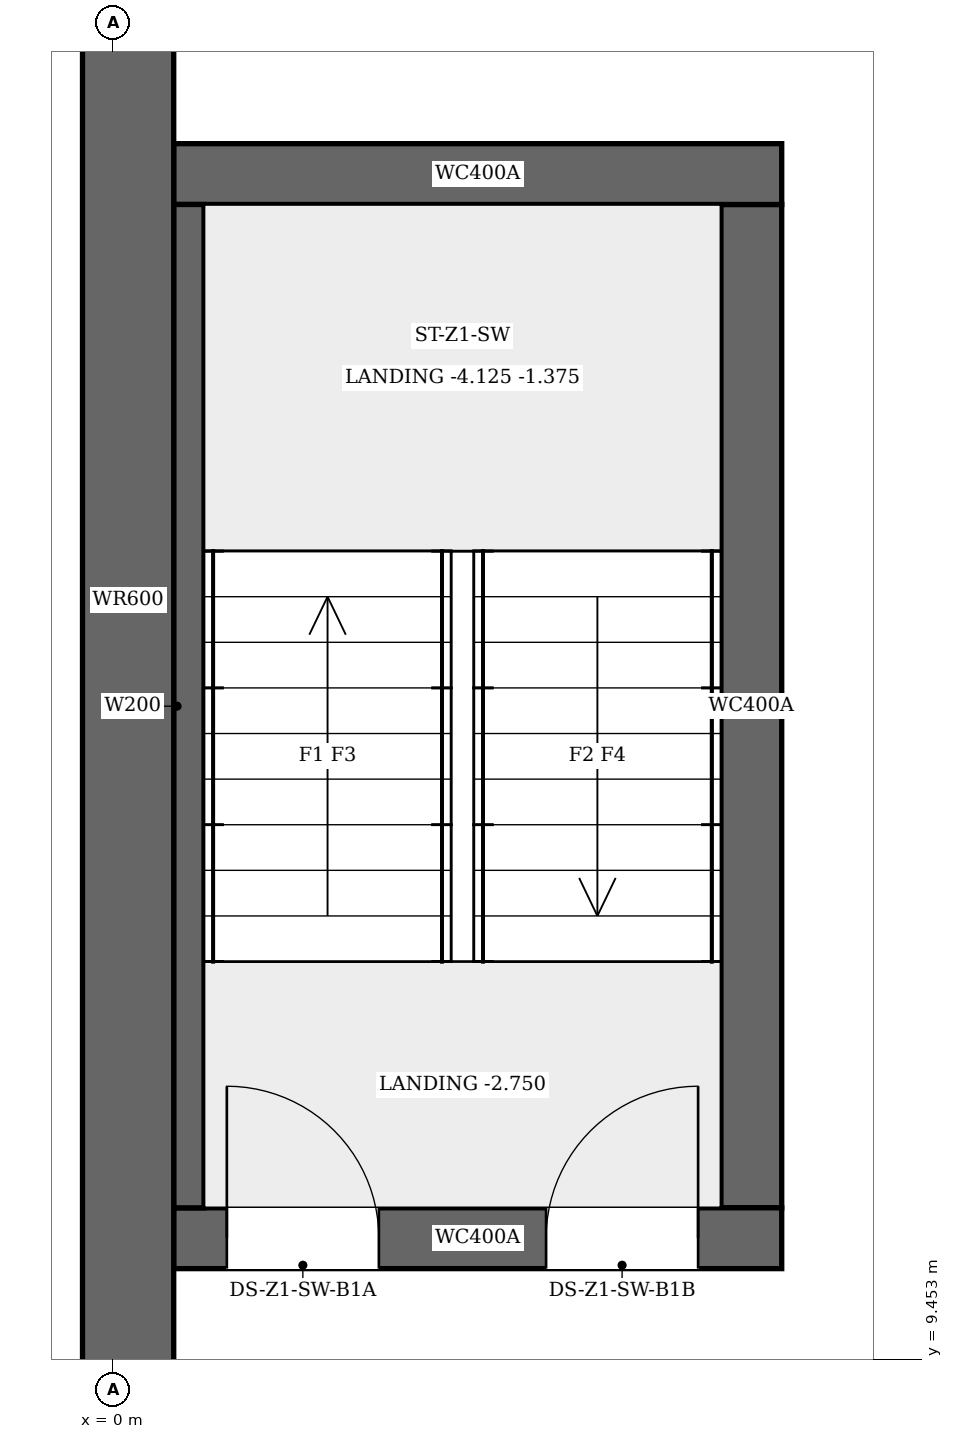
"""IFC4 building model, lengths in metres.
Left out: names, types, materials, properties, quantities, classifications, styles, units other than length and angle.
Written with IfcOpenShell. Run it as: python <this file> out.ifc"""

import sys

from ifc_helpers import new_model, si_unit, direction, frame, frame_2d, origin, place, context, subcontext, project, spatial, rectangle, extrude, element, fill, save


model = new_model("IFC4")
c1 = context("Model", 3, precision=1e-05, world=origin(), true_north=direction((0.0, 1.0)))
c2 = subcontext(c1, "Body", "Model", "MODEL_VIEW")
j1 = project(units=[si_unit("LENGTHUNIT", "METRE"), si_unit("PLANEANGLEUNIT", "RADIAN")], contexts=[c1])
p1 = place(None, origin())
s1 = spatial("IfcSite", under=j1, at=p1, CompositionType="ELEMENT")
p2 = place(p1, origin())
s2 = spatial("IfcBuilding", under=s1, at=p2, CompositionType="ELEMENT")
p3 = place(p2, frame((0.0, 0.0, -5.5)))
s3 = spatial("IfcBuildingStorey", under=s2, at=p3, CompositionType="ELEMENT", Elevation=-5.5)
p4 = place(p3, frame((0.101, -0.2, 0.0), z_axis=(0.0, 0.0, 1.0), x_axis=(0.0, 1.0, 0.0)))
e1 = element("IfcWall", 1, at=p4, inside=s3, PredefinedType="SOLIDWALL", context=c2, shape_type="SweptSolid", body=[
    extrude(rectangle(XDim=46.88, YDim=0.6, at=frame_2d((23.44, 0.0))), origin(), (0.0, 0.0, 1.0), 5.5),
])
p5 = place(p3, frame((0.4, 10.25, 0.0), z_axis=(0.0, 0.0, 1.0), x_axis=(1.0, 0.0, 0.0)))
e2 = element("IfcWall", 2, at=p5, inside=s3, PredefinedType="SHEAR", context=c2, shape_type="SweptSolid", body=[
    extrude(rectangle(XDim=4.0, YDim=0.4, at=frame_2d((2.0, 0.0))), origin(), (0.0, 0.0, 1.0), 5.5),
])
p6 = place(p5, frame((0.35, 0.0, 0.0)))
e3 = element("IfcOpeningElement", 3, at=p6, cuts=e2, PredefinedType="OPENING", context=c2, shape_type="SweptSolid", body=[
    extrude(rectangle(XDim=1.0, YDim=2.1, at=frame_2d((0.5, 1.05))), frame((0.0, 0.21, 0.0), z_axis=(0.0, -1.0, 0.0), x_axis=(1.0, 0.0, 0.0)), (0.0, 0.0, 1.0), 0.42),
])
p7 = place(p5, frame((2.45, 0.0, 0.0)))
e4 = element("IfcOpeningElement", 4, at=p7, cuts=e2, PredefinedType="OPENING", context=c2, shape_type="SweptSolid", body=[
    extrude(rectangle(XDim=1.0, YDim=2.1, at=frame_2d((0.5, 1.05))), frame((0.0, 0.21, 0.0), z_axis=(0.0, -1.0, 0.0), x_axis=(1.0, 0.0, 0.0)), (0.0, 0.0, 1.0), 0.42),
])
p8 = place(p3, frame((0.4, 17.25, 0.0), z_axis=(0.0, 0.0, 1.0), x_axis=(1.0, 0.0, 0.0)))
e5 = element("IfcWall", 5, at=p8, inside=s3, PredefinedType="SHEAR", context=c2, shape_type="SweptSolid", body=[
    extrude(rectangle(XDim=4.0, YDim=0.4, at=frame_2d((2.0, 0.0))), origin(), (0.0, 0.0, 1.0), 5.5),
])
p9 = place(p3, frame((0.5, 10.45, 0.0), z_axis=(0.0, 0.0, 1.0), x_axis=(0.0, 1.0, 0.0)))
e6 = element("IfcWall", 6, at=p9, inside=s3, PredefinedType="SHEAR", context=c2, shape_type="SweptSolid", body=[
    extrude(rectangle(XDim=6.6, YDim=0.2, at=frame_2d((3.3, 0.0))), origin(), (0.0, 0.0, 1.0), 5.5),
])
p10 = place(p3, frame((4.2, 10.45, 0.0), z_axis=(0.0, 0.0, 1.0), x_axis=(0.0, 1.0, 0.0)))
e7 = element("IfcWall", 7, at=p10, inside=s3, PredefinedType="SHEAR", context=c2, shape_type="SweptSolid", body=[
    extrude(rectangle(XDim=6.6, YDim=0.4, at=frame_2d((3.3, 0.0))), origin(), (0.0, 0.0, 1.0), 5.5),
])
p11 = place(p6, origin())
e8 = element("IfcDoor", 8, at=p11, inside=s3, OperationType="SINGLE_SWING_RIGHT", PredefinedType="DOOR", context=c2, shape_type="SweptSolid", body=[
    extrude(rectangle(XDim=1.0, YDim=2.1, at=frame_2d((0.5, 1.05))), frame((0.0, 0.025, 0.0), z_axis=(0.0, -1.0, 0.0), x_axis=(1.0, 0.0, 0.0)), (0.0, 0.0, 1.0), 0.05),
])
fill(e3, e8)
p12 = place(p7, origin())
e9 = element("IfcDoor", 9, at=p12, inside=s3, OperationType="SINGLE_SWING_LEFT", PredefinedType="DOOR", context=c2, shape_type="SweptSolid", body=[
    extrude(rectangle(XDim=1.0, YDim=2.1, at=frame_2d((0.5, 1.05))), frame((0.0, 0.025, 0.0), z_axis=(0.0, -1.0, 0.0), x_axis=(1.0, 0.0, 0.0)), (0.0, 0.0, 1.0), 0.05),
])
fill(e4, e9)
save(model, sys.argv[1])
